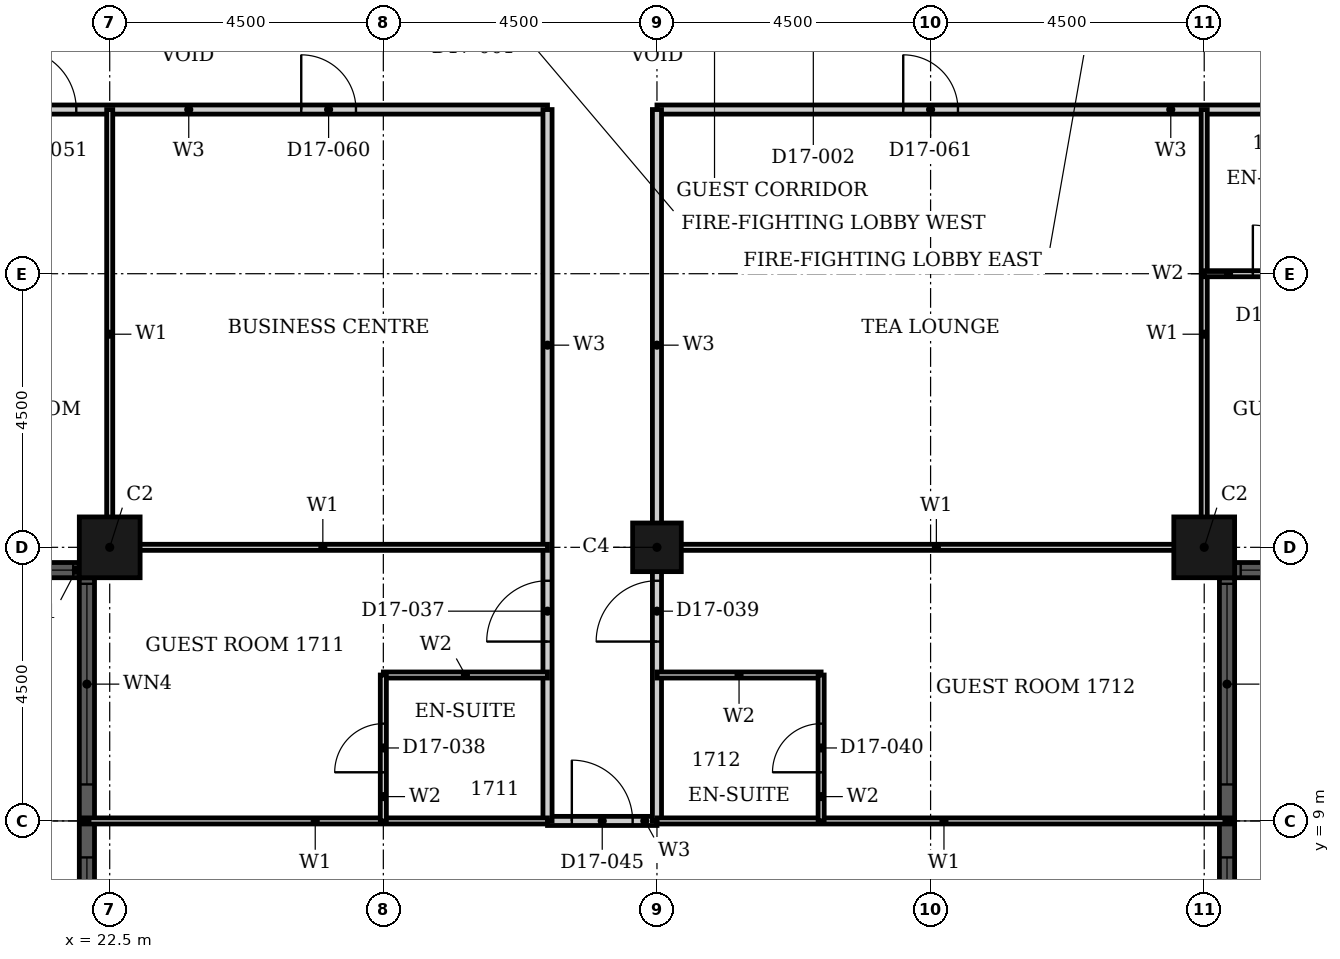
"""IFC4 building model, lengths in metres.
Left out: names, types, materials, properties, quantities, classifications, styles, units other than length and angle.
Written with IfcOpenShell. Run it as: python <this file> out.ifc"""

import sys

from ifc_helpers import new_model, si_unit, direction, frame, frame_2d, origin, origin_2d, place, context, subcontext, project, spatial, rectangle, hollow_rectangle, extrude, element, fill, save


model = new_model("IFC4")
c1 = context("Model", 3, precision=1e-05, world=origin(), true_north=direction((0.0, 1.0)))
c2 = subcontext(c1, "Body", "Model", "MODEL_VIEW")
j1 = project(units=[si_unit("LENGTHUNIT", "METRE"), si_unit("PLANEANGLEUNIT", "RADIAN")], contexts=[c1])
p1 = place(None, origin())
s1 = spatial("IfcSite", under=j1, at=p1, CompositionType="ELEMENT")
p2 = place(p1, origin())
s2 = spatial("IfcBuilding", under=s1, at=p2, CompositionType="ELEMENT")
p3 = place(p2, frame((0.0, 0.0, 74.4)))
s3 = spatial("IfcBuildingStorey", under=s2, at=p3, CompositionType="ELEMENT", Elevation=74.4)
for number, where, z_axis, x_axis in (
    (1, (40.5, 13.5, 0.0), (0.0, 0.0, 1.0), (1.0, 0.0, 0.0)),
    (2, (22.5, 13.5, 0.0), (0.0, 0.0, 1.0), (1.0, 0.0, 0.0)),
):
    element("IfcColumn", number, at=place(p3, frame(where, z_axis=z_axis, x_axis=x_axis)), inside=s3, PredefinedType="COLUMN", context=c2, shape_type="SweptSolid", body=[
        extrude(hollow_rectangle(XDim=1.0, YDim=1.0, WallThickness=0.032, at=origin_2d()), origin(), (0.0, 0.0, 1.0), 3.6),
    ])
p4 = place(p3, frame((31.5, 13.5, 0.0), z_axis=(0.0, 0.0, 1.0), x_axis=(1.0, 0.0, 0.0)))
e3 = element("IfcColumn", 3, at=p4, inside=s3, PredefinedType="COLUMN", context=c2, shape_type="SweptSolid", body=[
    extrude(hollow_rectangle(XDim=0.8, YDim=0.8, WallThickness=0.025, at=origin_2d()), origin(), (0.0, 0.0, 1.0), 3.6),
])
p5 = place(p3, frame((40.875, 5.0, 0.0), z_axis=(0.0, 0.0, 1.0), x_axis=(0.0, 1.0, 0.0)))
e4 = element("IfcWall", 4, at=p5, inside=s3, PredefinedType="SOLIDWALL", context=c2, shape_type="SweptSolid", body=[
    extrude(rectangle(XDim=8.0, YDim=0.25, at=frame_2d((4.0, 0.0))), origin(), (0.0, 0.0, 1.0), 3.6),
])
p6 = place(p5, frame((0.1, 0.0, 0.9)))
e5 = element("IfcOpeningElement", 5, at=p6, cuts=e4, PredefinedType="OPENING", context=c2, shape_type="SweptSolid", body=[
    extrude(rectangle(XDim=3.3, YDim=2.08, at=frame_2d((1.65, 1.04))), frame((0.0, 0.135, 0.0), z_axis=(0.0, -1.0, 0.0), x_axis=(1.0, 0.0, 0.0)), (0.0, 0.0, 1.0), 0.27),
])
p7 = place(p5, frame((4.6, 0.0, 0.9)))
e6 = element("IfcOpeningElement", 6, at=p7, cuts=e4, PredefinedType="OPENING", context=c2, shape_type="SweptSolid", body=[
    extrude(rectangle(XDim=3.3, YDim=2.08, at=frame_2d((1.65, 1.04))), frame((0.0, 0.135, 0.0), z_axis=(0.0, -1.0, 0.0), x_axis=(1.0, 0.0, 0.0)), (0.0, 0.0, 1.0), 0.27),
])
p8 = place(p3, frame((41.0, 13.125, 0.0), z_axis=(0.0, 0.0, 1.0), x_axis=(1.0, 0.0, 0.0)))
e7 = element("IfcWall", 7, at=p8, inside=s3, PredefinedType="SOLIDWALL", context=c2, shape_type="SweptSolid", body=[
    extrude(rectangle(XDim=3.5, YDim=0.25, at=frame_2d((1.75, 0.0))), origin(), (0.0, 0.0, 1.0), 3.6),
])
p9 = place(p8, frame((0.1, 0.0, 0.9)))
e8 = element("IfcOpeningElement", 8, at=p9, cuts=e7, PredefinedType="OPENING", context=c2, shape_type="SweptSolid", body=[
    extrude(rectangle(XDim=3.3, YDim=2.08, at=frame_2d((1.65, 1.04))), frame((0.0, 0.135, 0.0), z_axis=(0.0, -1.0, 0.0), x_axis=(1.0, 0.0, 0.0)), (0.0, 0.0, 1.0), 0.27),
])
p10 = place(p3, frame((18.5, 13.125, 0.0), z_axis=(0.0, 0.0, 1.0), x_axis=(1.0, 0.0, 0.0)))
e9 = element("IfcWall", 9, at=p10, inside=s3, PredefinedType="SOLIDWALL", context=c2, shape_type="SweptSolid", body=[
    extrude(rectangle(XDim=3.5, YDim=0.25, at=frame_2d((1.75, 0.0))), origin(), (0.0, 0.0, 1.0), 3.6),
])
p11 = place(p10, frame((0.1, 0.0, 0.9)))
e10 = element("IfcOpeningElement", 10, at=p11, cuts=e9, PredefinedType="OPENING", context=c2, shape_type="SweptSolid", body=[
    extrude(rectangle(XDim=3.3, YDim=2.08, at=frame_2d((1.65, 1.04))), frame((0.0, 0.135, 0.0), z_axis=(0.0, -1.0, 0.0), x_axis=(1.0, 0.0, 0.0)), (0.0, 0.0, 1.0), 0.27),
])
p12 = place(p3, frame((22.125, 13.0, 0.0), z_axis=(0.0, 0.0, 1.0), x_axis=(0.0, -1.0, 0.0)))
e11 = element("IfcWall", 11, at=p12, inside=s3, PredefinedType="SOLIDWALL", context=c2, shape_type="SweptSolid", body=[
    extrude(rectangle(XDim=8.0, YDim=0.25, at=frame_2d((4.0, 0.0))), origin(), (0.0, 0.0, 1.0), 3.6),
])
p13 = place(p12, frame((0.1, 0.0, 0.9)))
e12 = element("IfcOpeningElement", 12, at=p13, cuts=e11, PredefinedType="OPENING", context=c2, shape_type="SweptSolid", body=[
    extrude(rectangle(XDim=3.3, YDim=2.08, at=frame_2d((1.65, 1.04))), frame((0.0, 0.135, 0.0), z_axis=(0.0, -1.0, 0.0), x_axis=(1.0, 0.0, 0.0)), (0.0, 0.0, 1.0), 0.27),
])
p14 = place(p12, frame((4.6, 0.0, 0.9)))
e13 = element("IfcOpeningElement", 13, at=p14, cuts=e11, PredefinedType="OPENING", context=c2, shape_type="SweptSolid", body=[
    extrude(rectangle(XDim=3.3, YDim=2.08, at=frame_2d((1.65, 1.04))), frame((0.0, 0.135, 0.0), z_axis=(0.0, -1.0, 0.0), x_axis=(1.0, 0.0, 0.0)), (0.0, 0.0, 1.0), 0.27),
])
p15 = place(p3, frame((31.5, 20.7, 0.0), z_axis=(0.0, 0.0, 1.0), x_axis=(1.0, 0.0, 0.0)))
e14 = element("IfcWall", 14, at=p15, inside=s3, PredefinedType="PARTITIONING", context=c2, shape_type="SweptSolid", body=[
    extrude(rectangle(XDim=15.3, YDim=0.15, at=frame_2d((7.65, 0.0))), origin(), (0.0, 0.0, 1.0), 3.3),
])
p16 = place(p15, frame((11.95, 0.0, 0.0)))
e15 = element("IfcOpeningElement", 15, at=p16, cuts=e14, PredefinedType="OPENING", context=c2, shape_type="SweptSolid", body=[
    extrude(rectangle(XDim=1.0, YDim=2.1, at=frame_2d((0.5, 1.05))), frame((0.0, 0.085, 0.0), z_axis=(0.0, -1.0, 0.0), x_axis=(1.0, 0.0, 0.0)), (0.0, 0.0, 1.0), 0.17),
])
p17 = place(p15, frame((13.95, 0.0, 0.0)))
e16 = element("IfcOpeningElement", 16, at=p17, cuts=e14, PredefinedType="OPENING", context=c2, shape_type="SweptSolid", body=[
    extrude(rectangle(XDim=0.9, YDim=2.1, at=frame_2d((0.45, 1.05))), frame((0.0, 0.085, 0.0), z_axis=(0.0, -1.0, 0.0), x_axis=(1.0, 0.0, 0.0)), (0.0, 0.0, 1.0), 0.17),
])
p18 = place(p15, frame((4.05, 0.0, 0.0)))
e17 = element("IfcOpeningElement", 17, at=p18, cuts=e14, PredefinedType="OPENING", context=c2, shape_type="SweptSolid", body=[
    extrude(rectangle(XDim=0.9, YDim=2.1, at=frame_2d((0.45, 1.05))), frame((0.0, 0.085, 0.0), z_axis=(0.0, -1.0, 0.0), x_axis=(1.0, 0.0, 0.0)), (0.0, 0.0, 1.0), 0.17),
])
p19 = place(p3, frame((16.2, 20.7, 0.0), z_axis=(0.0, 0.0, 1.0), x_axis=(1.0, 0.0, 0.0)))
e18 = element("IfcWall", 18, at=p19, inside=s3, PredefinedType="PARTITIONING", context=c2, shape_type="SweptSolid", body=[
    extrude(rectangle(XDim=13.5, YDim=0.15, at=frame_2d((6.75, 0.0))), origin(), (0.0, 0.0, 1.0), 3.3),
])
p20 = place(p19, frame((4.75, 0.0, 0.0)))
e19 = element("IfcOpeningElement", 19, at=p20, cuts=e18, PredefinedType="OPENING", context=c2, shape_type="SweptSolid", body=[
    extrude(rectangle(XDim=1.0, YDim=2.1, at=frame_2d((0.5, 1.05))), frame((0.0, 0.085, 0.0), z_axis=(0.0, -1.0, 0.0), x_axis=(1.0, 0.0, 0.0)), (0.0, 0.0, 1.0), 0.17),
])
p21 = place(p19, frame((0.45, 0.0, 0.0)))
e20 = element("IfcOpeningElement", 20, at=p21, cuts=e18, PredefinedType="OPENING", context=c2, shape_type="SweptSolid", body=[
    extrude(rectangle(XDim=0.9, YDim=2.1, at=frame_2d((0.45, 1.05))), frame((0.0, 0.085, 0.0), z_axis=(0.0, -1.0, 0.0), x_axis=(1.0, 0.0, 0.0)), (0.0, 0.0, 1.0), 0.17),
])
p22 = place(p19, frame((9.45, 0.0, 0.0)))
e21 = element("IfcOpeningElement", 21, at=p22, cuts=e18, PredefinedType="OPENING", context=c2, shape_type="SweptSolid", body=[
    extrude(rectangle(XDim=0.9, YDim=2.1, at=frame_2d((0.45, 1.05))), frame((0.0, 0.085, 0.0), z_axis=(0.0, -1.0, 0.0), x_axis=(1.0, 0.0, 0.0)), (0.0, 0.0, 1.0), 0.17),
])
p23 = place(p3, frame((29.7, 9.0, 0.0), z_axis=(0.0, 0.0, 1.0), x_axis=(1.0, 0.0, 0.0)))
e22 = element("IfcWall", 22, at=p23, inside=s3, PredefinedType="PARTITIONING", context=c2, shape_type="SweptSolid", body=[
    extrude(rectangle(XDim=1.8, YDim=0.15, at=frame_2d((0.9, 0.0))), origin(), (0.0, 0.0, 1.0), 3.3),
])
p24 = place(p23, frame((0.4, 0.0, 0.0)))
e23 = element("IfcOpeningElement", 23, at=p24, cuts=e22, PredefinedType="OPENING", context=c2, shape_type="SweptSolid", body=[
    extrude(rectangle(XDim=1.0, YDim=2.1, at=frame_2d((0.5, 1.05))), frame((0.0, 0.085, 0.0), z_axis=(0.0, -1.0, 0.0), x_axis=(1.0, 0.0, 0.0)), (0.0, 0.0, 1.0), 0.17),
])
p25 = place(p3, frame((29.7, 9.0, 0.0), z_axis=(0.0, 0.0, 1.0), x_axis=(0.0, 1.0, 0.0)))
e24 = element("IfcWall", 24, at=p25, inside=s3, PredefinedType="PARTITIONING", context=c2, shape_type="SweptSolid", body=[
    extrude(rectangle(XDim=11.7, YDim=0.15, at=frame_2d((5.85, 0.0))), origin(), (0.0, 0.0, 1.0), 3.3),
])
p26 = place(p25, frame((2.95, 0.0, 0.0)))
e25 = element("IfcOpeningElement", 25, at=p26, cuts=e24, PredefinedType="OPENING", context=c2, shape_type="SweptSolid", body=[
    extrude(rectangle(XDim=1.0, YDim=2.1, at=frame_2d((0.5, 1.05))), frame((0.0, 0.085, 0.0), z_axis=(0.0, -1.0, 0.0), x_axis=(1.0, 0.0, 0.0)), (0.0, 0.0, 1.0), 0.17),
])
p27 = place(p3, frame((31.5, 9.0, 0.0), z_axis=(0.0, 0.0, 1.0), x_axis=(0.0, 1.0, 0.0)))
e26 = element("IfcWall", 26, at=p27, inside=s3, PredefinedType="PARTITIONING", context=c2, shape_type="SweptSolid", body=[
    extrude(rectangle(XDim=11.7, YDim=0.15, at=frame_2d((5.85, 0.0))), origin(), (0.0, 0.0, 1.0), 2.58),
])
p28 = place(p27, frame((2.95, 0.0, 0.0)))
e27 = element("IfcOpeningElement", 27, at=p28, cuts=e26, PredefinedType="OPENING", context=c2, shape_type="SweptSolid", body=[
    extrude(rectangle(XDim=1.0, YDim=2.1, at=frame_2d((0.5, 1.05))), frame((0.0, 0.085, 0.0), z_axis=(0.0, -1.0, 0.0), x_axis=(1.0, 0.0, 0.0)), (0.0, 0.0, 1.0), 0.17),
])
p29 = place(p3, frame((31.5, 13.5, 0.0), z_axis=(0.0, 0.0, 1.0), x_axis=(1.0, 0.0, 0.0)))
e28 = element("IfcWall", 28, at=p29, inside=s3, PredefinedType="PARTITIONING", context=c2, shape_type="SweptSolid", body=[
    extrude(rectangle(XDim=9.19, YDim=0.1, at=frame_2d((4.595, 0.0))), origin(), (0.0, 0.0, 1.0), 2.38),
])
p30 = place(p3, frame((22.31, 13.5, 0.0), z_axis=(0.0, 0.0, 1.0), x_axis=(1.0, 0.0, 0.0)))
e29 = element("IfcWall", 29, at=p30, inside=s3, PredefinedType="PARTITIONING", context=c2, shape_type="SweptSolid", body=[
    extrude(rectangle(XDim=7.39, YDim=0.1, at=frame_2d((3.695, 0.0))), origin(), (0.0, 0.0, 1.0), 2.38),
])
p31 = place(p3, frame((31.5, 9.0, 0.0), z_axis=(0.0, 0.0, 1.0), x_axis=(1.0, 0.0, 0.0)))
e30 = element("IfcWall", 30, at=p31, inside=s3, PredefinedType="PARTITIONING", context=c2, shape_type="SweptSolid", body=[
    extrude(rectangle(XDim=9.44, YDim=0.1, at=frame_2d((4.72, 0.0))), origin(), (0.0, 0.0, 1.0), 3.3),
])
p32 = place(p3, frame((22.06, 9.0, 0.0), z_axis=(0.0, 0.0, 1.0), x_axis=(1.0, 0.0, 0.0)))
e31 = element("IfcWall", 31, at=p32, inside=s3, PredefinedType="PARTITIONING", context=c2, shape_type="SweptSolid", body=[
    extrude(rectangle(XDim=7.64, YDim=0.1, at=frame_2d((3.82, 0.0))), origin(), (0.0, 0.0, 1.0), 3.3),
])
for number, where, z_axis, x_axis in (
    (32, (22.5, 13.31, 0.0), (0.0, 0.0, 1.0), (0.0, 1.0, 0.0)),
    (33, (40.5, 13.31, 0.0), (0.0, 0.0, 1.0), (0.0, 1.0, 0.0)),
):
    element("IfcWall", number, at=place(p3, frame(where, z_axis=z_axis, x_axis=x_axis)), inside=s3, PredefinedType="PARTITIONING", context=c2, shape_type="SweptSolid", body=[
        extrude(rectangle(XDim=7.39, YDim=0.1, at=frame_2d((3.695, 0.0))), origin(), (0.0, 0.0, 1.0), 3.3),
    ])
for number, where, z_axis, x_axis in (
    (34, (31.5, 11.4, 0.0), (0.0, 0.0, 1.0), (1.0, 0.0, 0.0)),
    (35, (27.0, 11.4, 0.0), (0.0, 0.0, 1.0), (1.0, 0.0, 0.0)),
):
    element("IfcWall", number, at=place(p3, frame(where, z_axis=z_axis, x_axis=x_axis)), inside=s3, PredefinedType="PARTITIONING", context=c2, shape_type="SweptSolid", body=[
        extrude(rectangle(XDim=2.7, YDim=0.1, at=frame_2d((1.35, 0.0))), origin(), (0.0, 0.0, 1.0), 3.3),
    ])
p33 = place(p3, frame((40.5, 18.0, 0.0), z_axis=(0.0, 0.0, 1.0), x_axis=(1.0, 0.0, 0.0)))
e36 = element("IfcWall", 36, at=p33, inside=s3, PredefinedType="PARTITIONING", context=c2, shape_type="SweptSolid", body=[
    extrude(rectangle(XDim=2.4, YDim=0.1, at=frame_2d((1.2, 0.0))), origin(), (0.0, 0.0, 1.0), 3.3),
])
p34 = place(p33, frame((0.8, 0.0, 0.0)))
e37 = element("IfcOpeningElement", 37, at=p34, cuts=e36, PredefinedType="OPENING", context=c2, shape_type="SweptSolid", body=[
    extrude(rectangle(XDim=0.8, YDim=2.1, at=frame_2d((0.4, 1.05))), frame((0.0, 0.06, 0.0), z_axis=(0.0, -1.0, 0.0), x_axis=(1.0, 0.0, 0.0)), (0.0, 0.0, 1.0), 0.12),
])
p35 = place(p3, frame((27.0, 9.0, 0.0), z_axis=(0.0, 0.0, 1.0), x_axis=(0.0, 1.0, 0.0)))
e38 = element("IfcWall", 38, at=p35, inside=s3, PredefinedType="PARTITIONING", context=c2, shape_type="SweptSolid", body=[
    extrude(rectangle(XDim=2.4, YDim=0.1, at=frame_2d((1.2, 0.0))), origin(), (0.0, 0.0, 1.0), 2.58),
])
p36 = place(p35, frame((0.8, 0.0, 0.0)))
e39 = element("IfcOpeningElement", 39, at=p36, cuts=e38, PredefinedType="OPENING", context=c2, shape_type="SweptSolid", body=[
    extrude(rectangle(XDim=0.8, YDim=2.1, at=frame_2d((0.4, 1.05))), frame((0.0, 0.06, 0.0), z_axis=(0.0, -1.0, 0.0), x_axis=(1.0, 0.0, 0.0)), (0.0, 0.0, 1.0), 0.12),
])
p37 = place(p3, frame((34.2, 9.0, 0.0), z_axis=(0.0, 0.0, 1.0), x_axis=(0.0, 1.0, 0.0)))
e40 = element("IfcWall", 40, at=p37, inside=s3, PredefinedType="PARTITIONING", context=c2, shape_type="SweptSolid", body=[
    extrude(rectangle(XDim=2.4, YDim=0.1, at=frame_2d((1.2, 0.0))), origin(), (0.0, 0.0, 1.0), 3.3),
])
p38 = place(p37, frame((0.8, 0.0, 0.0)))
e41 = element("IfcOpeningElement", 41, at=p38, cuts=e40, PredefinedType="OPENING", context=c2, shape_type="SweptSolid", body=[
    extrude(rectangle(XDim=0.8, YDim=2.1, at=frame_2d((0.4, 1.05))), frame((0.0, 0.06, 0.0), z_axis=(0.0, -1.0, 0.0), x_axis=(1.0, 0.0, 0.0)), (0.0, 0.0, 1.0), 0.12),
])
p39 = place(p6, origin())
e42 = element("IfcWindow", 42, at=p39, inside=s3, PartitioningType="SINGLE_PANEL", PredefinedType="WINDOW", context=c2, shape_type="SweptSolid", body=[
    extrude(rectangle(XDim=3.3, YDim=2.08, at=frame_2d((1.65, 1.04))), frame((0.0, 0.03, 0.0), z_axis=(0.0, -1.0, 0.0), x_axis=(1.0, 0.0, 0.0)), (0.0, 0.0, 1.0), 0.06),
])
fill(e5, e42)
p40 = place(p7, origin())
e43 = element("IfcWindow", 43, at=p40, inside=s3, PartitioningType="SINGLE_PANEL", PredefinedType="WINDOW", context=c2, shape_type="SweptSolid", body=[
    extrude(rectangle(XDim=3.3, YDim=2.08, at=frame_2d((1.65, 1.04))), frame((0.0, 0.03, 0.0), z_axis=(0.0, -1.0, 0.0), x_axis=(1.0, 0.0, 0.0)), (0.0, 0.0, 1.0), 0.06),
])
fill(e6, e43)
p41 = place(p9, origin())
e44 = element("IfcWindow", 44, at=p41, inside=s3, PartitioningType="SINGLE_PANEL", PredefinedType="WINDOW", context=c2, shape_type="SweptSolid", body=[
    extrude(rectangle(XDim=3.3, YDim=2.08, at=frame_2d((1.65, 1.04))), frame((0.0, 0.03, 0.0), z_axis=(0.0, -1.0, 0.0), x_axis=(1.0, 0.0, 0.0)), (0.0, 0.0, 1.0), 0.06),
])
fill(e8, e44)
p42 = place(p11, origin())
e45 = element("IfcWindow", 45, at=p42, inside=s3, PartitioningType="SINGLE_PANEL", PredefinedType="WINDOW", context=c2, shape_type="SweptSolid", body=[
    extrude(rectangle(XDim=3.3, YDim=2.08, at=frame_2d((1.65, 1.04))), frame((0.0, 0.03, 0.0), z_axis=(0.0, -1.0, 0.0), x_axis=(1.0, 0.0, 0.0)), (0.0, 0.0, 1.0), 0.06),
])
fill(e10, e45)
p43 = place(p13, origin())
e46 = element("IfcWindow", 46, at=p43, inside=s3, PartitioningType="SINGLE_PANEL", PredefinedType="WINDOW", context=c2, shape_type="SweptSolid", body=[
    extrude(rectangle(XDim=3.3, YDim=2.08, at=frame_2d((1.65, 1.04))), frame((0.0, 0.03, 0.0), z_axis=(0.0, -1.0, 0.0), x_axis=(1.0, 0.0, 0.0)), (0.0, 0.0, 1.0), 0.06),
])
fill(e12, e46)
p44 = place(p14, origin())
e47 = element("IfcWindow", 47, at=p44, inside=s3, PartitioningType="SINGLE_PANEL", PredefinedType="WINDOW", context=c2, shape_type="SweptSolid", body=[
    extrude(rectangle(XDim=3.3, YDim=2.08, at=frame_2d((1.65, 1.04))), frame((0.0, 0.03, 0.0), z_axis=(0.0, -1.0, 0.0), x_axis=(1.0, 0.0, 0.0)), (0.0, 0.0, 1.0), 0.06),
])
fill(e13, e47)
p45 = place(p26, origin())
e48 = element("IfcDoor", 48, at=p45, inside=s3, OperationType="SINGLE_SWING_RIGHT", PredefinedType="DOOR", context=c2, shape_type="SweptSolid", body=[
    extrude(rectangle(XDim=1.0, YDim=2.1, at=frame_2d((0.5, 1.05))), frame((0.0, 0.025, 0.0), z_axis=(0.0, -1.0, 0.0), x_axis=(1.0, 0.0, 0.0)), (0.0, 0.0, 1.0), 0.05),
])
fill(e25, e48)
p46 = place(p36, origin())
e49 = element("IfcDoor", 49, at=p46, inside=s3, OperationType="SINGLE_SWING_RIGHT", PredefinedType="DOOR", context=c2, shape_type="SweptSolid", body=[
    extrude(rectangle(XDim=0.8, YDim=2.1, at=frame_2d((0.4, 1.05))), frame((0.0, 0.025, 0.0), z_axis=(0.0, -1.0, 0.0), x_axis=(1.0, 0.0, 0.0)), (0.0, 0.0, 1.0), 0.05),
])
fill(e39, e49)
p47 = place(p28, origin())
e50 = element("IfcDoor", 50, at=p47, inside=s3, OperationType="SINGLE_SWING_RIGHT", PredefinedType="DOOR", context=c2, shape_type="SweptSolid", body=[
    extrude(rectangle(XDim=1.0, YDim=2.1, at=frame_2d((0.5, 1.05))), frame((0.0, 0.025, 0.0), z_axis=(0.0, -1.0, 0.0), x_axis=(1.0, 0.0, 0.0)), (0.0, 0.0, 1.0), 0.05),
])
fill(e27, e50)
p48 = place(p38, origin())
e51 = element("IfcDoor", 51, at=p48, inside=s3, OperationType="SINGLE_SWING_LEFT", PredefinedType="DOOR", context=c2, shape_type="SweptSolid", body=[
    extrude(rectangle(XDim=0.8, YDim=2.1, at=frame_2d((0.4, 1.05))), frame((0.0, 0.025, 0.0), z_axis=(0.0, -1.0, 0.0), x_axis=(1.0, 0.0, 0.0)), (0.0, 0.0, 1.0), 0.05),
])
fill(e41, e51)
p49 = place(p24, origin())
e52 = element("IfcDoor", 52, at=p49, inside=s3, OperationType="SINGLE_SWING_LEFT", PredefinedType="DOOR", context=c2, shape_type="SweptSolid", body=[
    extrude(rectangle(XDim=1.0, YDim=2.1, at=frame_2d((0.5, 1.05))), frame((0.0, 0.025, 0.0), z_axis=(0.0, -1.0, 0.0), x_axis=(1.0, 0.0, 0.0)), (0.0, 0.0, 1.0), 0.05),
])
fill(e23, e52)
p50 = place(p20, origin())
e53 = element("IfcDoor", 53, at=p50, inside=s3, OperationType="SINGLE_SWING_RIGHT", PredefinedType="DOOR", context=c2, shape_type="SweptSolid", body=[
    extrude(rectangle(XDim=1.0, YDim=2.1, at=frame_2d((0.5, 1.05))), frame((0.0, 0.025, 0.0), z_axis=(0.0, -1.0, 0.0), x_axis=(1.0, 0.0, 0.0)), (0.0, 0.0, 1.0), 0.05),
])
fill(e19, e53)
p51 = place(p34, origin())
e54 = element("IfcDoor", 54, at=p51, inside=s3, OperationType="SINGLE_SWING_LEFT", PredefinedType="DOOR", context=c2, shape_type="SweptSolid", body=[
    extrude(rectangle(XDim=0.8, YDim=2.1, at=frame_2d((0.4, 1.05))), frame((0.0, 0.025, 0.0), z_axis=(0.0, -1.0, 0.0), x_axis=(1.0, 0.0, 0.0)), (0.0, 0.0, 1.0), 0.05),
])
fill(e37, e54)
p52 = place(p22, origin())
e55 = element("IfcDoor", 55, at=p52, inside=s3, OperationType="SINGLE_SWING_LEFT", PredefinedType="DOOR", context=c2, shape_type="SweptSolid", body=[
    extrude(rectangle(XDim=0.9, YDim=2.1, at=frame_2d((0.45, 1.05))), frame((0.0, 0.025, 0.0), z_axis=(0.0, -1.0, 0.0), x_axis=(1.0, 0.0, 0.0)), (0.0, 0.0, 1.0), 0.05),
])
fill(e21, e55)
p53 = place(p18, origin())
e56 = element("IfcDoor", 56, at=p53, inside=s3, OperationType="SINGLE_SWING_RIGHT", PredefinedType="DOOR", context=c2, shape_type="SweptSolid", body=[
    extrude(rectangle(XDim=0.9, YDim=2.1, at=frame_2d((0.45, 1.05))), frame((0.0, 0.025, 0.0), z_axis=(0.0, -1.0, 0.0), x_axis=(1.0, 0.0, 0.0)), (0.0, 0.0, 1.0), 0.05),
])
fill(e17, e56)
save(model, sys.argv[1])
